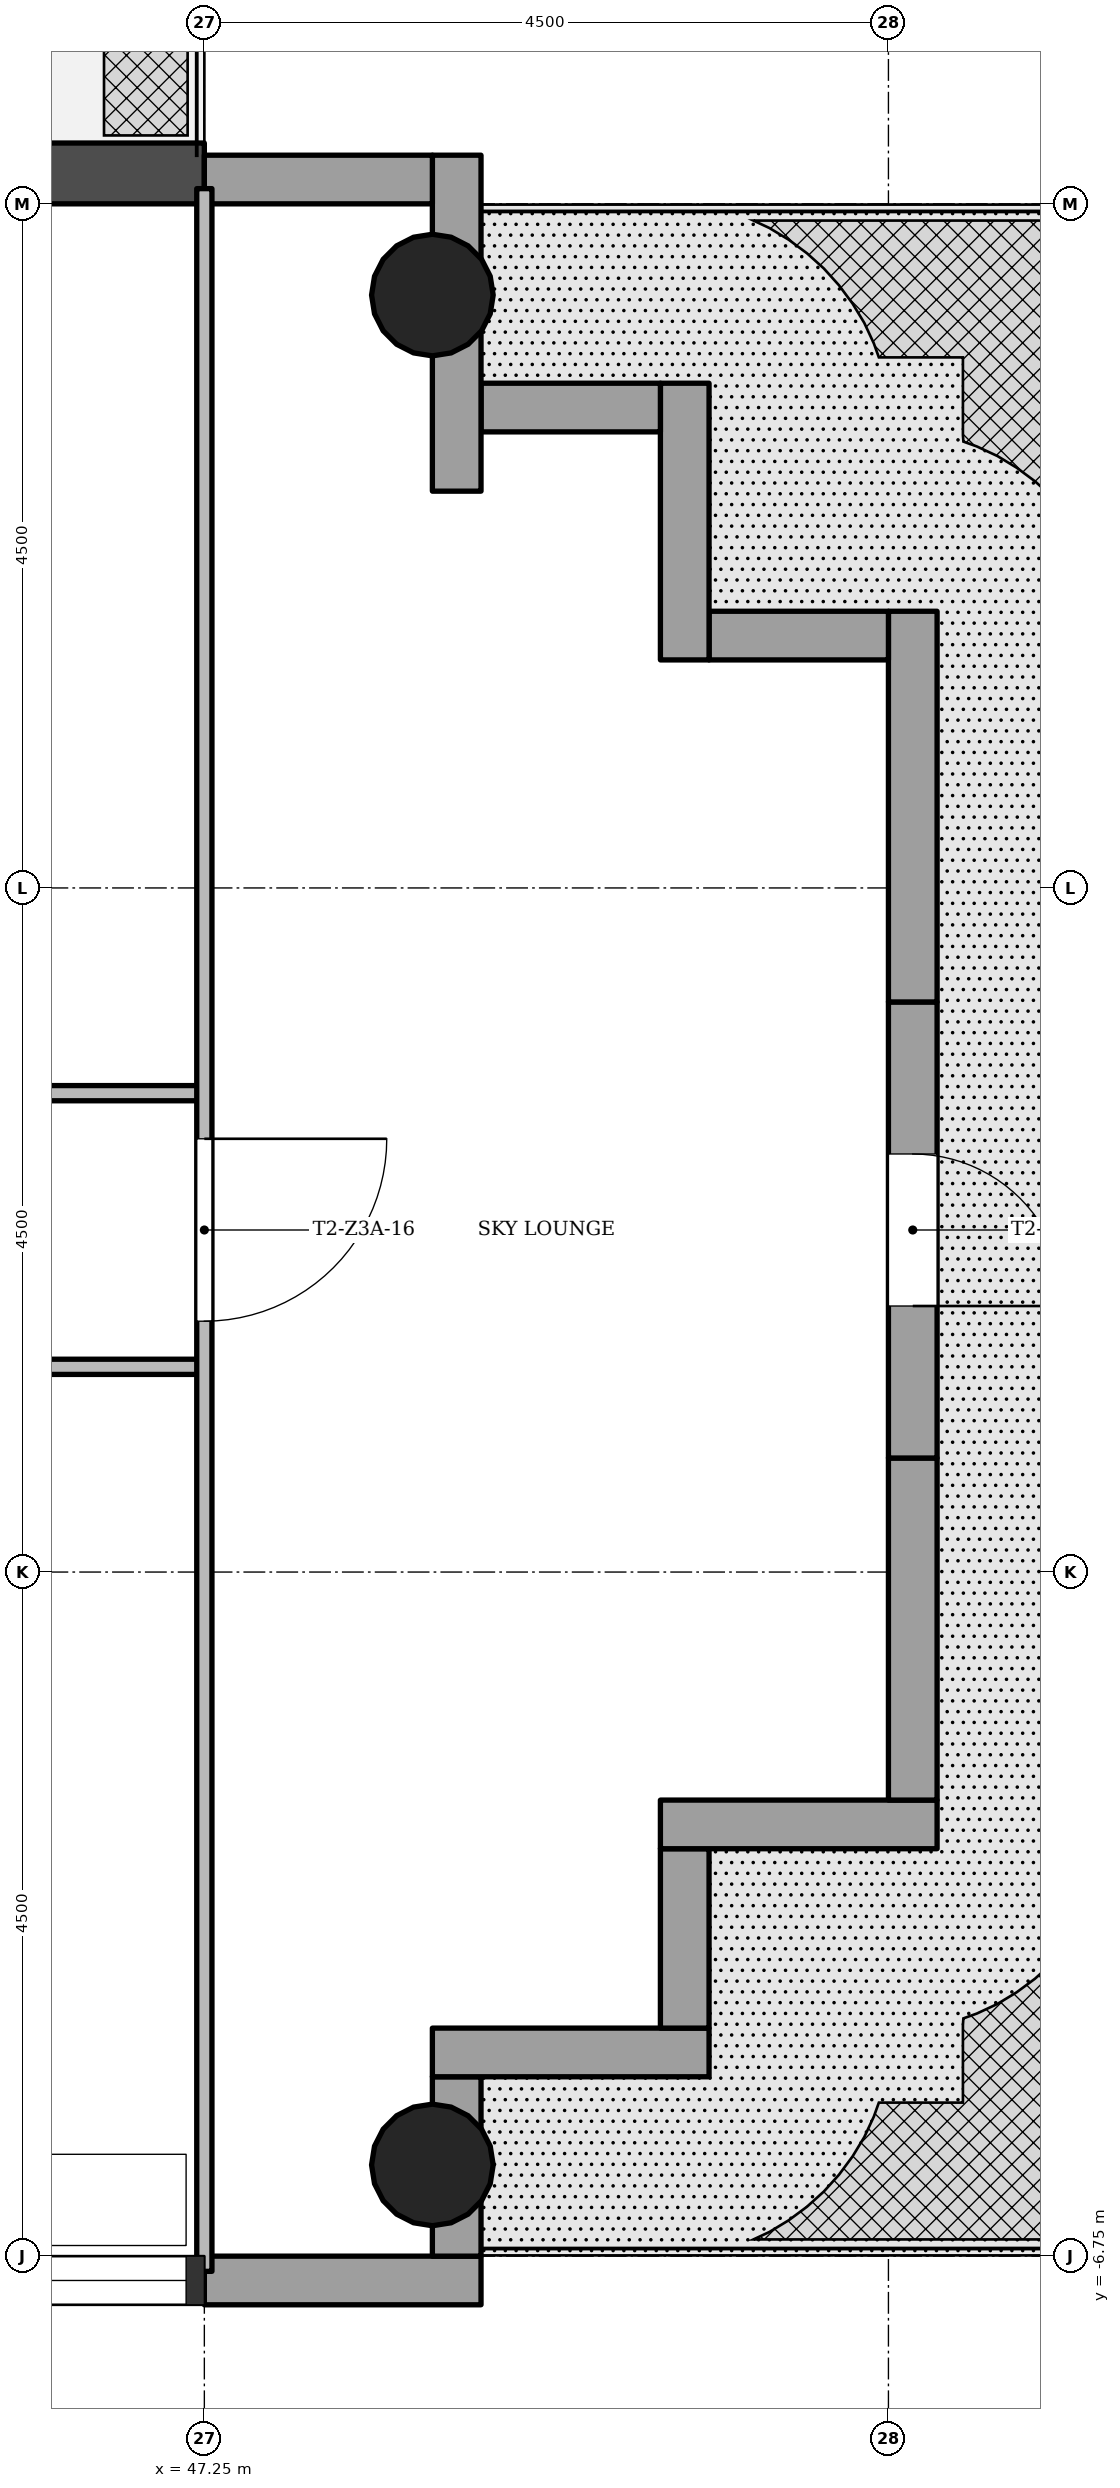
"""IFC4 building model, lengths in metres.
Left out: names, types, materials, properties, quantities, classifications, styles, units other than length and angle.
Written with IfcOpenShell. Run it as: python <this file> out.ifc"""

import sys

from ifc_helpers import new_model, si_unit, direction, frame, frame_2d, origin, origin_2d, place, context, subcontext, project, spatial, rectangle, hollow_circle, extrude, element, fill, save


model = new_model("IFC4")
c1 = context("Model", 3, precision=1e-05, world=origin(), true_north=direction((0.0, 1.0)))
c2 = subcontext(c1, "Body", "Model", "MODEL_VIEW")
j1 = project(units=[si_unit("LENGTHUNIT", "METRE"), si_unit("PLANEANGLEUNIT", "RADIAN")], contexts=[c1])
p1 = place(None, origin())
s1 = spatial("IfcSite", under=j1, at=p1, CompositionType="ELEMENT")
p2 = place(p1, origin())
s2 = spatial("IfcBuilding", under=s1, at=p2, CompositionType="ELEMENT")
p3 = place(p2, frame((0.0, 0.0, 133.7)))
s3 = spatial("IfcBuildingStorey", under=s2, at=p3, CompositionType="ELEMENT", Elevation=133.7)
for number, where, z_axis, x_axis in (
    (1, (48.75, -6.15, 0.0), (0.0, 0.0, 1.0), (1.0, 0.0, 0.0)),
    (2, (48.75, 6.15, 0.0), (0.0, 0.0, 1.0), (1.0, 0.0, 0.0)),
):
    element("IfcColumn", number, at=place(p3, frame(where, z_axis=z_axis, x_axis=x_axis)), inside=s3, PredefinedType="COLUMN", context=c2, shape_type="SweptSolid", body=[
        extrude(hollow_circle(Radius=0.4, WallThickness=0.028, at=origin_2d()), origin(), (0.0, 0.0, 1.0), 3.4),
    ])
p4 = place(p3, frame((47.25, -6.91, 0.0), z_axis=(0.0, 0.0, 1.0), x_axis=(1.0, 0.0, 0.0)))
e3 = element("IfcWall", 3, at=p4, inside=s3, PredefinedType="STANDARD", context=c2, shape_type="SweptSolid", body=[
    extrude(rectangle(XDim=1.82, YDim=0.32, at=frame_2d((0.91, 0.0))), origin(), (0.0, 0.0, 1.0), 3.1),
])
p5 = place(p3, frame((48.91, -6.75, -0.02), z_axis=(0.0, 0.0, 1.0), x_axis=(0.0, 1.0, 0.0)))
e4 = element("IfcWall", 4, at=p5, inside=s3, PredefinedType="STANDARD", context=c2, shape_type="SweptSolid", body=[
    extrude(rectangle(XDim=1.18, YDim=0.32, at=frame_2d((0.59, 0.0))), origin(), (0.0, 0.0, 1.0), 3.12),
])
p6 = place(p3, frame((48.75, -5.41, -0.02), z_axis=(0.0, 0.0, 1.0), x_axis=(1.0, 0.0, 0.0)))
e5 = element("IfcWall", 5, at=p6, inside=s3, PredefinedType="STANDARD", context=c2, shape_type="SweptSolid", body=[
    extrude(rectangle(XDim=1.82, YDim=0.32, at=frame_2d((0.91, 0.0))), origin(), (0.0, 0.0, 1.0), 3.12),
])
p7 = place(p3, frame((50.41, -5.25, -0.02), z_axis=(0.0, 0.0, 1.0), x_axis=(0.0, 1.0, 0.0)))
e6 = element("IfcWall", 6, at=p7, inside=s3, PredefinedType="STANDARD", context=c2, shape_type="SweptSolid", body=[
    extrude(rectangle(XDim=1.18, YDim=0.32, at=frame_2d((0.59, 0.0))), origin(), (0.0, 0.0, 1.0), 3.12),
])
p8 = place(p3, frame((50.25, -3.91, -0.02), z_axis=(0.0, 0.0, 1.0), x_axis=(1.0, 0.0, 0.0)))
e7 = element("IfcWall", 7, at=p8, inside=s3, PredefinedType="STANDARD", context=c2, shape_type="SweptSolid", body=[
    extrude(rectangle(XDim=1.82, YDim=0.32, at=frame_2d((0.91, 0.0))), origin(), (0.0, 0.0, 1.0), 3.12),
])
p9 = place(p3, frame((51.91, -3.75, -0.02), z_axis=(0.0, 0.0, 1.0), x_axis=(0.0, 1.0, 0.0)))
e8 = element("IfcWall", 8, at=p9, inside=s3, PredefinedType="STANDARD", context=c2, shape_type="SweptSolid", body=[
    extrude(rectangle(XDim=2.25, YDim=0.32, at=frame_2d((1.125, 0.0))), origin(), (0.0, 0.0, 1.0), 3.12),
])
p10 = place(p3, frame((51.91, -1.5, -0.02), z_axis=(0.0, 0.0, 1.0), x_axis=(0.0, 1.0, 0.0)))
e9 = element("IfcWall", 9, at=p10, inside=s3, PredefinedType="STANDARD", context=c2, shape_type="SweptSolid", body=[
    extrude(rectangle(XDim=3.0, YDim=0.32, at=frame_2d((1.5, 0.0))), origin(), (0.0, 0.0, 1.0), 3.12),
])
p11 = place(p10, frame((1.0, 0.0, 0.02)))
e10 = element("IfcOpeningElement", 10, at=p11, cuts=e9, PredefinedType="OPENING", context=c2, shape_type="SweptSolid", body=[
    extrude(rectangle(XDim=1.0, YDim=2.1, at=frame_2d((0.5, 1.05))), frame((0.0, 0.17, 0.0), z_axis=(0.0, -1.0, 0.0), x_axis=(1.0, 0.0, 0.0)), (0.0, 0.0, 1.0), 0.34),
])
p12 = place(p3, frame((51.91, 1.5, -0.02), z_axis=(0.0, 0.0, 1.0), x_axis=(0.0, 1.0, 0.0)))
e11 = element("IfcWall", 11, at=p12, inside=s3, PredefinedType="STANDARD", context=c2, shape_type="SweptSolid", body=[
    extrude(rectangle(XDim=2.57, YDim=0.32, at=frame_2d((1.285, 0.0))), origin(), (0.0, 0.0, 1.0), 3.12),
])
p13 = place(p3, frame((51.75, 3.91, -0.02), z_axis=(0.0, 0.0, 1.0), x_axis=(-1.0, 0.0, 0.0)))
e12 = element("IfcWall", 12, at=p13, inside=s3, PredefinedType="STANDARD", context=c2, shape_type="SweptSolid", body=[
    extrude(rectangle(XDim=1.18, YDim=0.32, at=frame_2d((0.59, 0.0))), origin(), (0.0, 0.0, 1.0), 3.12),
])
p14 = place(p3, frame((50.41, 3.75, -0.02), z_axis=(0.0, 0.0, 1.0), x_axis=(0.0, 1.0, 0.0)))
e13 = element("IfcWall", 13, at=p14, inside=s3, PredefinedType="STANDARD", context=c2, shape_type="SweptSolid", body=[
    extrude(rectangle(XDim=1.82, YDim=0.32, at=frame_2d((0.91, 0.0))), origin(), (0.0, 0.0, 1.0), 3.12),
])
p15 = place(p3, frame((50.25, 5.41, -0.02), z_axis=(0.0, 0.0, 1.0), x_axis=(-1.0, 0.0, 0.0)))
e14 = element("IfcWall", 14, at=p15, inside=s3, PredefinedType="STANDARD", context=c2, shape_type="SweptSolid", body=[
    extrude(rectangle(XDim=1.18, YDim=0.32, at=frame_2d((0.59, 0.0))), origin(), (0.0, 0.0, 1.0), 3.12),
])
p16 = place(p3, frame((48.91, 4.86, -0.02), z_axis=(0.0, 0.0, 1.0), x_axis=(0.0, 1.0, 0.0)))
e15 = element("IfcWall", 15, at=p16, inside=s3, PredefinedType="STANDARD", context=c2, shape_type="SweptSolid", body=[
    extrude(rectangle(XDim=2.21, YDim=0.32, at=frame_2d((1.105, 0.0))), origin(), (0.0, 0.0, 1.0), 3.12),
])
p17 = place(p3, frame((48.75, 6.91, 0.0), z_axis=(0.0, 0.0, 1.0), x_axis=(-1.0, 0.0, 0.0)))
e16 = element("IfcWall", 16, at=p17, inside=s3, PredefinedType="STANDARD", context=c2, shape_type="SweptSolid", body=[
    extrude(rectangle(XDim=1.5, YDim=0.32, at=frame_2d((0.75, 0.0))), origin(), (0.0, 0.0, 1.0), 3.1),
])
p18 = place(p3, frame((47.25, 6.95, -0.02), z_axis=(0.0, 0.0, 1.0), x_axis=(-1.0, 0.0, 0.0)))
e17 = element("IfcWall", 17, at=p18, inside=s3, PredefinedType="STANDARD", context=c2, shape_type="SweptSolid", body=[
    extrude(rectangle(XDim=4.5, YDim=0.4, at=frame_2d((2.25, 0.0))), origin(), (0.0, 0.0, 1.0), 3.12),
])
p19 = place(p18, frame((1.35, 0.0, 0.02)))
e18 = element("IfcOpeningElement", 18, at=p19, cuts=e17, PredefinedType="OPENING", context=c2, shape_type="SweptSolid", body=[
    extrude(rectangle(XDim=1.8, YDim=2.1, at=frame_2d((0.9, 1.05))), frame((0.0, 0.21, 0.0), z_axis=(0.0, -1.0, 0.0), x_axis=(1.0, 0.0, 0.0)), (0.0, 0.0, 1.0), 0.42),
])
p20 = place(p3, frame((47.25, -0.9, 0.0), z_axis=(0.0, 0.0, 1.0), x_axis=(-1.0, 0.0, 0.0)))
e19 = element("IfcWall", 19, at=p20, inside=s3, PredefinedType="PARTITIONING", context=c2, shape_type="SweptSolid", body=[
    extrude(rectangle(XDim=6.75, YDim=0.1, at=frame_2d((3.375, 0.0))), origin(), (0.0, 0.0, 1.0), 3.0),
])
p21 = place(p20, frame((1.8, 0.0, 0.0)))
e20 = element("IfcOpeningElement", 20, at=p21, cuts=e19, PredefinedType="OPENING", context=c2, shape_type="SweptSolid", body=[
    extrude(rectangle(XDim=0.9, YDim=2.1, at=frame_2d((0.45, 1.05))), frame((0.0, 0.06, 0.0), z_axis=(0.0, -1.0, 0.0), x_axis=(1.0, 0.0, 0.0)), (0.0, 0.0, 1.0), 0.12),
])
p22 = place(p3, frame((47.25, 0.9, 0.0), z_axis=(0.0, 0.0, 1.0), x_axis=(-1.0, 0.0, 0.0)))
e21 = element("IfcWall", 21, at=p22, inside=s3, PredefinedType="PARTITIONING", context=c2, shape_type="SweptSolid", body=[
    extrude(rectangle(XDim=6.75, YDim=0.1, at=frame_2d((3.375, 0.0))), origin(), (0.0, 0.0, 1.0), 3.0),
])
p23 = place(p22, frame((1.8, 0.0, 0.0)))
e22 = element("IfcOpeningElement", 22, at=p23, cuts=e21, PredefinedType="OPENING", context=c2, shape_type="SweptSolid", body=[
    extrude(rectangle(XDim=0.9, YDim=2.1, at=frame_2d((0.45, 1.05))), frame((0.0, 0.06, 0.0), z_axis=(0.0, -1.0, 0.0), x_axis=(1.0, 0.0, 0.0)), (0.0, 0.0, 1.0), 0.12),
])
p24 = place(p3, frame((47.25, -6.85, 0.0), z_axis=(0.0, 0.0, 1.0), x_axis=(0.0, 1.0, 0.0)))
e23 = element("IfcWall", 23, at=p24, inside=s3, PredefinedType="PARTITIONING", context=c2, shape_type="SweptSolid", body=[
    extrude(rectangle(XDim=13.7, YDim=0.1, at=frame_2d((6.85, 0.0))), origin(), (0.0, 0.0, 1.0), 3.0),
])
p25 = place(p24, frame((6.25, 0.0, 0.0)))
e24 = element("IfcOpeningElement", 24, at=p25, cuts=e23, PredefinedType="OPENING", context=c2, shape_type="SweptSolid", body=[
    extrude(rectangle(XDim=1.2, YDim=2.1, at=frame_2d((0.6, 1.05))), frame((0.0, 0.06, 0.0), z_axis=(0.0, -1.0, 0.0), x_axis=(1.0, 0.0, 0.0)), (0.0, 0.0, 1.0), 0.12),
])
p26 = place(p11, origin())
e25 = element("IfcDoor", 25, at=p26, inside=s3, OperationType="SINGLE_SWING_LEFT", PredefinedType="DOOR", context=c2, shape_type="SweptSolid", body=[
    extrude(rectangle(XDim=1.0, YDim=2.1, at=frame_2d((0.5, 1.05))), frame((0.0, 0.025, 0.0), z_axis=(0.0, -1.0, 0.0), x_axis=(1.0, 0.0, 0.0)), (0.0, 0.0, 1.0), 0.05),
])
fill(e10, e25)
p27 = place(p25, origin())
e26 = element("IfcDoor", 26, at=p27, inside=s3, OperationType="SINGLE_SWING_RIGHT", PredefinedType="DOOR", context=c2, shape_type="SweptSolid", body=[
    extrude(rectangle(XDim=1.2, YDim=2.1, at=frame_2d((0.6, 1.05))), frame((0.0, 0.025, 0.0), z_axis=(0.0, -1.0, 0.0), x_axis=(1.0, 0.0, 0.0)), (0.0, 0.0, 1.0), 0.05),
])
fill(e24, e26)
save(model, sys.argv[1])
